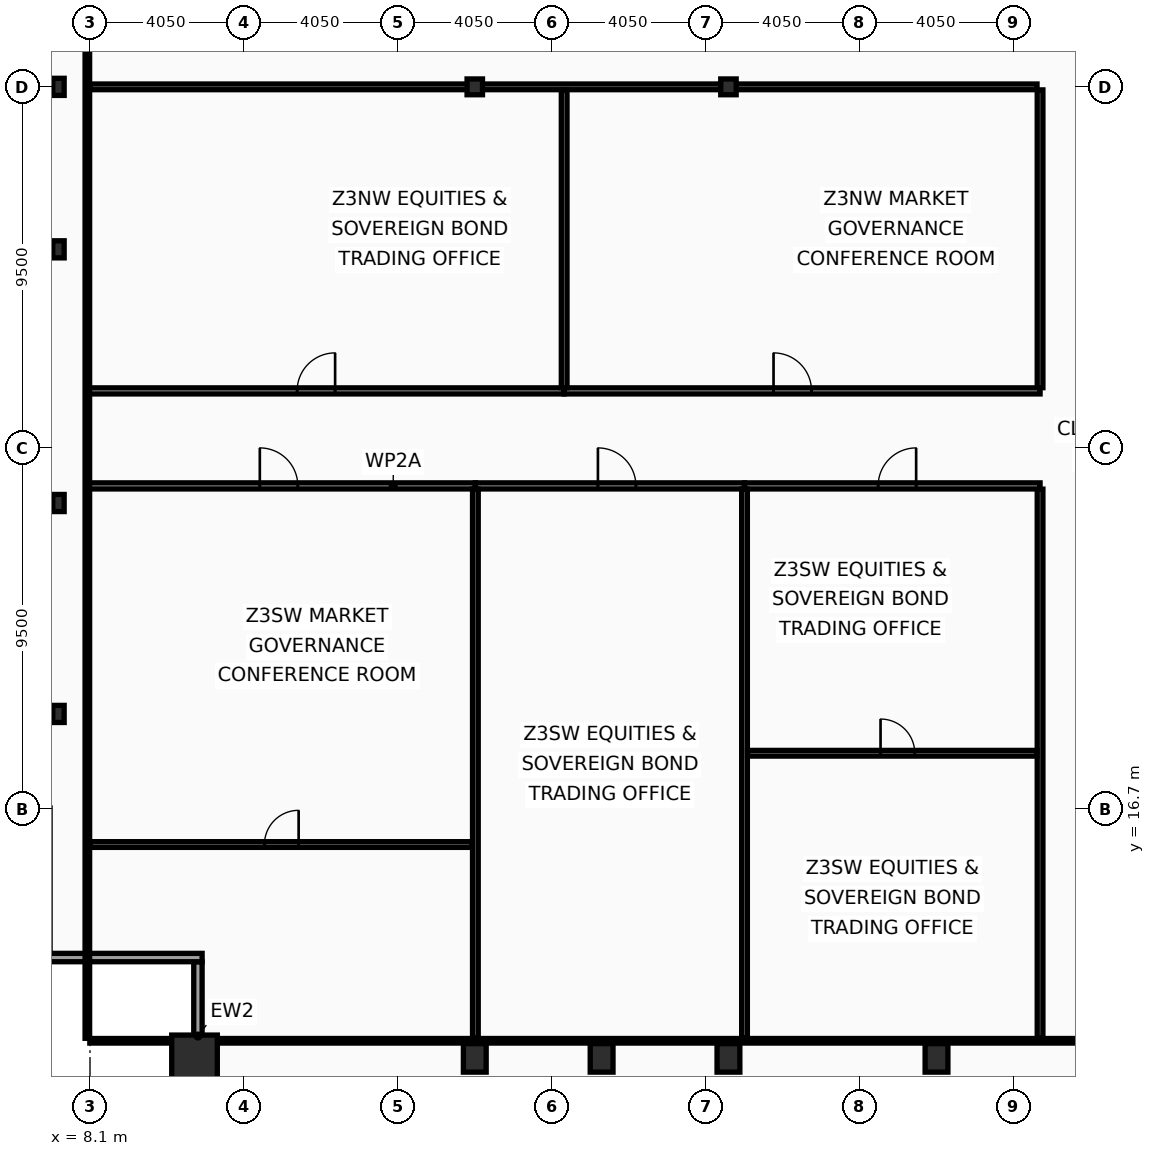
"""IFC4 building model, lengths in metres.
Left out: names, types, materials, properties, quantities, classifications, styles, units other than length and angle.
Written with IfcOpenShell. Run it as: python <this file> out.ifc"""

import sys

from ifc_helpers import new_model, si_unit, direction, frame, frame_2d, origin, origin_2d, place, context, subcontext, project, spatial, rectangle, hollow_rectangle, i_section, extrude, element, fill, save


model = new_model("IFC4")
c1 = context("Model", 3, precision=1e-05, world=origin(), true_north=direction((0.0, 1.0)))
c2 = subcontext(c1, "Body", "Model", "MODEL_VIEW")
j1 = project(units=[si_unit("LENGTHUNIT", "METRE"), si_unit("PLANEANGLEUNIT", "RADIAN")], contexts=[c1])
p1 = place(None, origin())
s1 = spatial("IfcSite", under=j1, at=p1, CompositionType="ELEMENT")
p2 = place(p1, origin())
s2 = spatial("IfcBuilding", under=s1, at=p2, CompositionType="ELEMENT")
p3 = place(p2, frame((0.0, 0.0, 228.2)))
s3 = spatial("IfcBuildingStorey", under=s2, at=p3, CompositionType="ELEMENT", Elevation=228.2)
p4 = place(p3, frame((10.85, 10.15, 0.0), z_axis=(0.0, 0.0, 1.0), x_axis=(1.0, 0.0, 0.0)))
e1 = element("IfcColumn", 1, at=p4, inside=s3, PredefinedType="COLUMN", context=c2, shape_type="SweptSolid", body=[
    extrude(hollow_rectangle(XDim=1.2, YDim=1.2, WallThickness=0.06, at=origin_2d()), origin(), (0.0, 0.0, 1.0), 3.6),
])
for number, where, z_axis, x_axis in (
    (2, (18.225, 10.15, 0.0), (0.0, 0.0, 1.0), (1.0, 0.0, 0.0)),
    (3, (21.562, 10.15, 0.0), (0.0, 0.0, 1.0), (1.0, 0.0, 0.0)),
    (4, (24.9, 10.15, 0.0), (0.0, 0.0, 1.0), (1.0, 0.0, 0.0)),
    (5, (30.375, 10.15, 0.0), (0.0, 0.0, 1.0), (1.0, 0.0, 0.0)),
):
    element("IfcColumn", number, at=place(p3, frame(where, z_axis=z_axis, x_axis=x_axis)), inside=s3, PredefinedType="COLUMN", context=c2, shape_type="SweptSolid", body=[
        extrude(hollow_rectangle(XDim=0.6, YDim=0.75, WallThickness=0.045, at=origin_2d()), origin(), (0.0, 0.0, 1.0), 3.6),
    ])
for number, where, z_axis, x_axis in (
    (6, (7.27, 19.2, 0.0), (0.0, 0.0, 1.0), (1.0, 0.0, 0.0)),
    (7, (7.27, 24.75, 0.0), (0.0, 0.0, 1.0), (1.0, 0.0, 0.0)),
    (8, (7.27, 31.425, 0.0), (0.0, 0.0, 1.0), (1.0, 0.0, 0.0)),
    (9, (7.27, 35.7, 0.0), (0.0, 0.0, 1.0), (1.0, 0.0, 0.0)),
):
    element("IfcColumn", number, at=place(p3, frame(where, z_axis=z_axis, x_axis=x_axis)), inside=s3, PredefinedType="COLUMN", context=c2, shape_type="SweptSolid", body=[
        extrude(i_section(OverallWidth=0.3, OverallDepth=0.45, WebThickness=0.014, FlangeThickness=0.026, at=origin_2d()), origin(), (0.0, 0.0, 1.0), 3.6),
    ])
for number, where, z_axis, x_axis in (
    (10, (18.225, 35.7, 0.0), (0.0, 0.0, 1.0), (1.0, 0.0, 0.0)),
    (11, (24.9, 35.7, 0.0), (0.0, 0.0, 1.0), (1.0, 0.0, 0.0)),
):
    element("IfcColumn", number, at=place(p3, frame(where, z_axis=z_axis, x_axis=x_axis)), inside=s3, PredefinedType="COLUMN", context=c2, shape_type="SweptSolid", body=[
        extrude(i_section(OverallWidth=0.406, OverallDepth=0.416, WebThickness=0.03, FlangeThickness=0.048, at=origin_2d()), origin(), (0.0, 0.0, 1.0), 3.6),
    ])
p5 = place(p3, frame((10.94, 8.77, 0.0), z_axis=(0.0, 0.0, 1.0), x_axis=(0.0, 1.0, 0.0)))
e12 = element("IfcWall", 12, at=p5, inside=s3, PredefinedType="SOLIDWALL", context=c2, shape_type="SweptSolid", body=[
    extrude(rectangle(XDim=3.91, YDim=0.22, at=frame_2d((1.955, 0.0))), origin(), (0.0, 0.0, 1.0), 2.83),
])
p6 = place(p3, frame((11.05, 12.79, 0.0), z_axis=(0.0, 0.0, 1.0), x_axis=(-1.0, 0.0, 0.0)))
e13 = element("IfcWall", 13, at=p6, inside=s3, PredefinedType="SOLIDWALL", context=c2, shape_type="SweptSolid", body=[
    extrude(rectangle(XDim=4.22, YDim=0.22, at=frame_2d((2.11, 0.0))), origin(), (0.0, 0.0, 1.0), 2.83),
])
p7 = place(p3, frame((33.1, 10.665, 0.0), z_axis=(0.0, 0.0, 1.0), x_axis=(0.0, 1.0, 0.0)))
e14 = element("IfcWall", 14, at=p7, inside=s3, PredefinedType="PARTITIONING", context=c2, shape_type="SweptSolid", body=[
    extrude(rectangle(XDim=14.45, YDim=0.15, at=frame_2d((7.225, 0.0))), origin(), (0.0, 0.0, 1.0), 2.98),
])
p8 = place(p3, frame((33.1, 27.785, 0.0), z_axis=(0.0, 0.0, 1.0), x_axis=(0.0, 1.0, 0.0)))
e15 = element("IfcWall", 15, at=p8, inside=s3, PredefinedType="PARTITIONING", context=c2, shape_type="SweptSolid", body=[
    extrude(rectangle(XDim=7.835, YDim=0.15, at=frame_2d((3.917, 0.0))), origin(), (0.0, 0.0, 1.0), 2.98),
])
p9 = place(p3, frame((8.095, 35.7, 0.0), z_axis=(0.0, 0.0, 1.0), x_axis=(1.0, 0.0, 0.0)))
e16 = element("IfcWall", 16, at=p9, inside=s3, PredefinedType="PARTITIONING", context=c2, shape_type="SweptSolid", body=[
    extrude(rectangle(XDim=24.925, YDim=0.15, at=frame_2d((12.462, 0.0))), origin(), (0.0, 0.0, 1.0), 2.78),
])
p10 = place(p3, frame((8.03, 25.2, 0.0), z_axis=(0.0, 0.0, 1.0), x_axis=(1.0, 0.0, 0.0)))
e17 = element("IfcWall", 17, at=p10, inside=s3, PredefinedType="PARTITIONING", context=c2, shape_type="SweptSolid", body=[
    extrude(rectangle(XDim=10.211, YDim=0.16, at=frame_2d((5.105, 0.0))), origin(), (0.0, 0.0, 1.0), 2.78),
])
p11 = place(p10, frame((4.539, 0.0, 0.0)))
e18 = element("IfcOpeningElement", 18, at=p11, cuts=e17, PredefinedType="OPENING", context=c2, shape_type="SweptSolid", body=[
    extrude(rectangle(XDim=1.0, YDim=2.05, at=frame_2d((0.5, 1.025))), frame((0.0, 0.09, 0.0), z_axis=(0.0, -1.0, 0.0), x_axis=(1.0, 0.0, 0.0)), (0.0, 0.0, 1.0), 0.18),
])
p12 = place(p3, frame((8.095, 15.764, 0.0), z_axis=(0.0, 0.0, 1.0), x_axis=(1.0, 0.0, 0.0)))
e19 = element("IfcWall", 19, at=p12, inside=s3, PredefinedType="PARTITIONING", context=c2, shape_type="SweptSolid", body=[
    extrude(rectangle(XDim=10.066, YDim=0.15, at=frame_2d((5.033, 0.0))), origin(), (0.0, 0.0, 1.0), 2.78),
])
p13 = place(p12, frame((4.595, 0.0, 0.0)))
e20 = element("IfcOpeningElement", 20, at=p13, cuts=e19, PredefinedType="OPENING", context=c2, shape_type="SweptSolid", body=[
    extrude(rectangle(XDim=0.9, YDim=2.05, at=frame_2d((0.45, 1.025))), frame((0.0, 0.085, 0.0), z_axis=(0.0, -1.0, 0.0), x_axis=(1.0, 0.0, 0.0)), (0.0, 0.0, 1.0), 0.17),
])
p14 = place(p3, frame((18.241, 25.2, 0.0), z_axis=(0.0, 0.0, 1.0), x_axis=(1.0, 0.0, 0.0)))
e21 = element("IfcWall", 21, at=p14, inside=s3, PredefinedType="PARTITIONING", context=c2, shape_type="SweptSolid", body=[
    extrude(rectangle(XDim=7.082, YDim=0.16, at=frame_2d((3.541, 0.0))), origin(), (0.0, 0.0, 1.0), 2.78),
])
p15 = place(p14, frame((3.224, 0.0, 0.0)))
e22 = element("IfcOpeningElement", 22, at=p15, cuts=e21, PredefinedType="OPENING", context=c2, shape_type="SweptSolid", body=[
    extrude(rectangle(XDim=1.0, YDim=2.05, at=frame_2d((0.5, 1.025))), frame((0.0, 0.09, 0.0), z_axis=(0.0, -1.0, 0.0), x_axis=(1.0, 0.0, 0.0)), (0.0, 0.0, 1.0), 0.18),
])
p16 = place(p3, frame((18.241, 10.665, 0.0), z_axis=(0.0, 0.0, 1.0), x_axis=(0.0, 1.0, 0.0)))
e23 = element("IfcWall", 23, at=p16, inside=s3, PredefinedType="PARTITIONING", context=c2, shape_type="SweptSolid", body=[
    extrude(rectangle(XDim=14.45, YDim=0.15, at=frame_2d((7.225, 0.0))), origin(), (0.0, 0.0, 1.0), 2.78),
])
p17 = place(p3, frame((25.323, 25.2, 0.0), z_axis=(0.0, 0.0, 1.0), x_axis=(1.0, 0.0, 0.0)))
e24 = element("IfcWall", 24, at=p17, inside=s3, PredefinedType="PARTITIONING", context=c2, shape_type="SweptSolid", body=[
    extrude(rectangle(XDim=7.777, YDim=0.16, at=frame_2d((3.889, 0.0))), origin(), (0.0, 0.0, 1.0), 2.78),
])
p18 = place(p17, frame((3.516, 0.0, 0.0)))
e25 = element("IfcOpeningElement", 25, at=p18, cuts=e24, PredefinedType="OPENING", context=c2, shape_type="SweptSolid", body=[
    extrude(rectangle(XDim=1.0, YDim=2.05, at=frame_2d((0.5, 1.025))), frame((0.0, 0.09, 0.0), z_axis=(0.0, -1.0, 0.0), x_axis=(1.0, 0.0, 0.0)), (0.0, 0.0, 1.0), 0.18),
])
p19 = place(p3, frame((25.323, 10.665, 0.0), z_axis=(0.0, 0.0, 1.0), x_axis=(0.0, 1.0, 0.0)))
e26 = element("IfcWall", 26, at=p19, inside=s3, PredefinedType="PARTITIONING", context=c2, shape_type="SweptSolid", body=[
    extrude(rectangle(XDim=14.45, YDim=0.15, at=frame_2d((7.225, 0.0))), origin(), (0.0, 0.0, 1.0), 2.78),
])
p20 = place(p3, frame((25.403, 18.166, 0.0), z_axis=(0.0, 0.0, 1.0), x_axis=(1.0, 0.0, 0.0)))
e27 = element("IfcWall", 27, at=p20, inside=s3, PredefinedType="PARTITIONING", context=c2, shape_type="SweptSolid", body=[
    extrude(rectangle(XDim=7.617, YDim=0.15, at=frame_2d((3.809, 0.0))), origin(), (0.0, 0.0, 1.0), 2.78),
])
p21 = place(p20, frame((3.5, 0.0, 0.0)))
e28 = element("IfcOpeningElement", 28, at=p21, cuts=e27, PredefinedType="OPENING", context=c2, shape_type="SweptSolid", body=[
    extrude(rectangle(XDim=0.9, YDim=2.05, at=frame_2d((0.45, 1.025))), frame((0.0, 0.085, 0.0), z_axis=(0.0, -1.0, 0.0), x_axis=(1.0, 0.0, 0.0)), (0.0, 0.0, 1.0), 0.17),
])
p22 = place(p3, frame((8.03, 27.7, 0.0), z_axis=(0.0, 0.0, 1.0), x_axis=(1.0, 0.0, 0.0)))
e29 = element("IfcWall", 29, at=p22, inside=s3, PredefinedType="PARTITIONING", context=c2, shape_type="SweptSolid", body=[
    extrude(rectangle(XDim=12.547, YDim=0.16, at=frame_2d((6.273, 0.0))), origin(), (0.0, 0.0, 1.0), 2.78),
])
p23 = place(p22, frame((5.52, 0.0, 0.0)))
e30 = element("IfcOpeningElement", 30, at=p23, cuts=e29, PredefinedType="OPENING", context=c2, shape_type="SweptSolid", body=[
    extrude(rectangle(XDim=1.0, YDim=2.05, at=frame_2d((0.5, 1.025))), frame((0.0, 0.09, 0.0), z_axis=(0.0, -1.0, 0.0), x_axis=(1.0, 0.0, 0.0)), (0.0, 0.0, 1.0), 0.18),
])
p24 = place(p3, frame((20.577, 27.7, 0.0), z_axis=(0.0, 0.0, 1.0), x_axis=(1.0, 0.0, 0.0)))
e31 = element("IfcWall", 31, at=p24, inside=s3, PredefinedType="PARTITIONING", context=c2, shape_type="SweptSolid", body=[
    extrude(rectangle(XDim=12.523, YDim=0.16, at=frame_2d((6.261, 0.0))), origin(), (0.0, 0.0, 1.0), 2.78),
])
p25 = place(p24, frame((5.51, 0.0, 0.0)))
e32 = element("IfcOpeningElement", 32, at=p25, cuts=e31, PredefinedType="OPENING", context=c2, shape_type="SweptSolid", body=[
    extrude(rectangle(XDim=1.0, YDim=2.05, at=frame_2d((0.5, 1.025))), frame((0.0, 0.09, 0.0), z_axis=(0.0, -1.0, 0.0), x_axis=(1.0, 0.0, 0.0)), (0.0, 0.0, 1.0), 0.18),
])
p26 = place(p3, frame((20.577, 27.785, 0.0), z_axis=(0.0, 0.0, 1.0), x_axis=(0.0, 1.0, 0.0)))
e33 = element("IfcWall", 33, at=p26, inside=s3, PredefinedType="PARTITIONING", context=c2, shape_type="SweptSolid", body=[
    extrude(rectangle(XDim=7.835, YDim=0.15, at=frame_2d((3.917, 0.0))), origin(), (0.0, 0.0, 1.0), 2.98),
])
p27 = place(p3, frame((8.03, 10.665, 0.0), z_axis=(0.0, 0.0, 1.0), x_axis=(0.0, 1.0, 0.0)))
e34 = element("IfcWall", 34, at=p27, inside=s3, PredefinedType="PARTITIONING", context=c2, shape_type="SweptSolid", body=[
    extrude(rectangle(XDim=42.11, YDim=0.12, at=frame_2d((21.055, 0.0))), origin(), (0.0, 0.0, 1.0), 2.78),
])
p28 = place(p3, frame((8.095, 10.6, 0.0), z_axis=(0.0, 0.0, 1.0), x_axis=(1.0, 0.0, 0.0)))
e35 = element("IfcWall", 35, at=p28, inside=s3, PredefinedType="PARTITIONING", context=c2, shape_type="SweptSolid", body=[
    extrude(rectangle(XDim=56.71, YDim=0.12, at=frame_2d((28.355, 0.0))), origin(), (0.0, 0.0, 1.0), 2.78),
])
p29 = place(p11, origin())
e36 = element("IfcDoor", 36, at=p29, inside=s3, OperationType="SINGLE_SWING_LEFT", PredefinedType="DOOR", context=c2, shape_type="SweptSolid", body=[
    extrude(rectangle(XDim=1.0, YDim=2.05, at=frame_2d((0.5, 1.025))), frame((0.0, 0.025, 0.0), z_axis=(0.0, -1.0, 0.0), x_axis=(1.0, 0.0, 0.0)), (0.0, 0.0, 1.0), 0.05),
])
fill(e18, e36)
p30 = place(p13, origin())
e37 = element("IfcDoor", 37, at=p30, inside=s3, OperationType="SINGLE_SWING_RIGHT", PredefinedType="DOOR", context=c2, shape_type="SweptSolid", body=[
    extrude(rectangle(XDim=0.9, YDim=2.05, at=frame_2d((0.45, 1.025))), frame((0.0, 0.025, 0.0), z_axis=(0.0, -1.0, 0.0), x_axis=(1.0, 0.0, 0.0)), (0.0, 0.0, 1.0), 0.05),
])
fill(e20, e37)
p31 = place(p15, origin())
e38 = element("IfcDoor", 38, at=p31, inside=s3, OperationType="SINGLE_SWING_LEFT", PredefinedType="DOOR", context=c2, shape_type="SweptSolid", body=[
    extrude(rectangle(XDim=1.0, YDim=2.05, at=frame_2d((0.5, 1.025))), frame((0.0, 0.025, 0.0), z_axis=(0.0, -1.0, 0.0), x_axis=(1.0, 0.0, 0.0)), (0.0, 0.0, 1.0), 0.05),
])
fill(e22, e38)
p32 = place(p18, origin())
e39 = element("IfcDoor", 39, at=p32, inside=s3, OperationType="SINGLE_SWING_RIGHT", PredefinedType="DOOR", context=c2, shape_type="SweptSolid", body=[
    extrude(rectangle(XDim=1.0, YDim=2.05, at=frame_2d((0.5, 1.025))), frame((0.0, 0.025, 0.0), z_axis=(0.0, -1.0, 0.0), x_axis=(1.0, 0.0, 0.0)), (0.0, 0.0, 1.0), 0.05),
])
fill(e25, e39)
p33 = place(p21, origin())
e40 = element("IfcDoor", 40, at=p33, inside=s3, OperationType="SINGLE_SWING_LEFT", PredefinedType="DOOR", context=c2, shape_type="SweptSolid", body=[
    extrude(rectangle(XDim=0.9, YDim=2.05, at=frame_2d((0.45, 1.025))), frame((0.0, 0.025, 0.0), z_axis=(0.0, -1.0, 0.0), x_axis=(1.0, 0.0, 0.0)), (0.0, 0.0, 1.0), 0.05),
])
fill(e28, e40)
p34 = place(p23, origin())
e41 = element("IfcDoor", 41, at=p34, inside=s3, OperationType="SINGLE_SWING_RIGHT", PredefinedType="DOOR", context=c2, shape_type="SweptSolid", body=[
    extrude(rectangle(XDim=1.0, YDim=2.05, at=frame_2d((0.5, 1.025))), frame((0.0, 0.025, 0.0), z_axis=(0.0, -1.0, 0.0), x_axis=(1.0, 0.0, 0.0)), (0.0, 0.0, 1.0), 0.05),
])
fill(e30, e41)
p35 = place(p25, origin())
e42 = element("IfcDoor", 42, at=p35, inside=s3, OperationType="SINGLE_SWING_LEFT", PredefinedType="DOOR", context=c2, shape_type="SweptSolid", body=[
    extrude(rectangle(XDim=1.0, YDim=2.05, at=frame_2d((0.5, 1.025))), frame((0.0, 0.025, 0.0), z_axis=(0.0, -1.0, 0.0), x_axis=(1.0, 0.0, 0.0)), (0.0, 0.0, 1.0), 0.05),
])
fill(e32, e42)
save(model, sys.argv[1])
